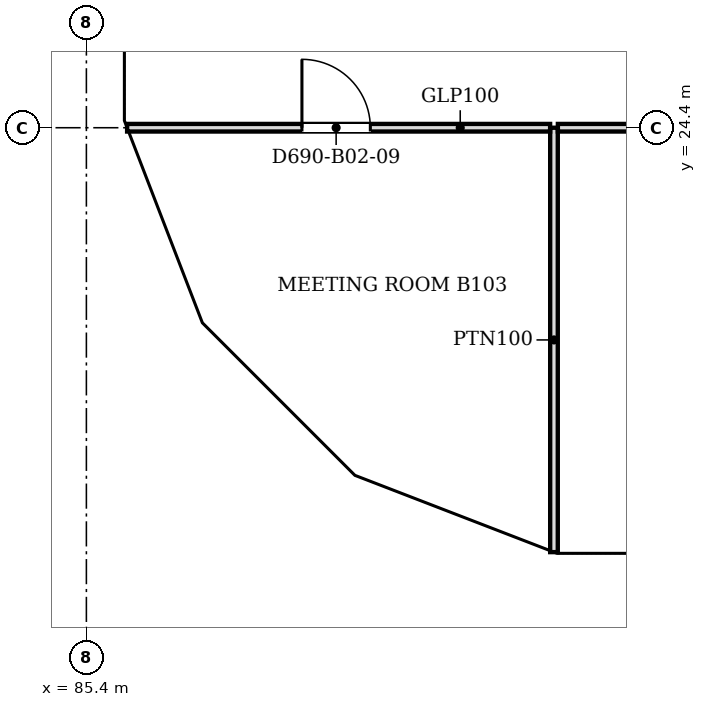
"""IFC4 building model, lengths in metres.
Left out: names, types, materials, properties, quantities, classifications, styles, units other than length and angle.
Written with IfcOpenShell. Run it as: python <this file> out.ifc"""

import sys

from ifc_helpers import new_model, si_unit, direction, frame, frame_2d, origin, place, context, subcontext, project, spatial, polyline, rectangle, outline, extrude, faceted_brep, source, transform, mapped, element, fill, save


model = new_model("IFC4")
c1 = context("Model", 3, precision=1e-05, world=origin(), true_north=direction((0.0, 1.0)))
c2 = subcontext(c1, "Body", "Model", "MODEL_VIEW")
j1 = project(units=[si_unit("LENGTHUNIT", "METRE"), si_unit("PLANEANGLEUNIT", "RADIAN")], contexts=[c1])
p1 = place(None, origin())
s1 = spatial("IfcSite", under=j1, at=p1, CompositionType="ELEMENT")
p2 = place(p1, origin())
s2 = spatial("IfcBuilding", under=s1, at=p2, CompositionType="ELEMENT")
p3 = place(p2, frame((0.0, 0.0, 21.3)))
s3 = spatial("IfcBuildingStorey", under=s2, at=p3, CompositionType="ELEMENT", Elevation=21.3)
m1 = source(origin(), c2, "Body", "Brep", [
    faceted_brep([(3.003, -0.25, 0.0), (6.053, -0.25, 4.5), (3.003, -0.25, 9.0), (0.0, -0.25, 4.5), (0.047, 0.25, 4.57), (3.003, 0.25, 9.0), (6.053, 0.25, 4.5), (3.003, 0.25, 0.0), (0.047, 0.25, 4.43), (0.0, 0.0, 4.5)], [[[0, 1, 2, 3]], [[4, 5, 6, 7, 8]], [[7, 6, 1, 0]], [[6, 5, 2, 1]], [[5, 4, 9, 3, 2]], [[8, 7, 0, 3, 9]], [[8, 9, 4]]]),
])
p4 = place(p3, frame((91.547, 18.55, -4.5), z_axis=(0.0, 0.0, 1.0), x_axis=(1.0, 0.0, 0.0)))
e1 = element("IfcWall", 1, at=p4, inside=s3, PredefinedType="SOLIDWALL", context=c2, shape_type="MappedRepresentation", body=[
    mapped(m1, transform((0.0, 0.0, 0.0), scale=1.0)),
])
m2 = source(origin(), c2, "Body", "SweptSolid", [
    extrude(outline(polyline([(3.005, 0.448), (5.751, 4.5), (3.005, 8.552), (0.301, 4.5), (3.005, 0.448)])), frame((0.0, 0.26, 0.0), z_axis=(0.0, -1.0, 0.0), x_axis=(1.0, 0.0, 0.0)), (0.0, 0.0, 1.0), 0.52),
])
p5 = place(p4, origin())
e2 = element("IfcOpeningElement", 2, at=p5, cuts=e1, PredefinedType="OPENING", context=c2, shape_type="MappedRepresentation", body=[
    mapped(m2, transform((0.0, 0.0, 0.0), scale=1.0)),
])
m3 = source(origin(), c2, "Body", "Brep", [
    faceted_brep([(1.753, -0.25, 0.0), (1.8, -0.25, 0.071), (1.8, -0.25, 8.929), (1.753, -0.25, 9.0), (0.0, -0.25, 6.373), (0.0, -0.25, 2.627), (0.0, 0.25, 2.627), (0.0, 0.25, 6.373), (1.707, 0.25, 8.93), (1.707, 0.25, 0.07), (1.753, 0.0, 0.0), (1.753, 0.0, 9.0)], [[[0, 1, 2, 3, 4, 5]], [[6, 7, 8, 9]], [[1, 0, 10]], [[11, 3, 2]], [[8, 7, 4, 3, 11]], [[7, 6, 5, 4]], [[6, 9, 10, 0, 5]], [[1, 10, 9, 8, 11, 2]]]),
])
p6 = place(p3, frame((85.65, 26.2, -4.5), z_axis=(0.0, 0.0, 1.0), x_axis=(0.0, -1.0, 0.0)))
e3 = element("IfcWall", 3, at=p6, inside=s3, PredefinedType="SOLIDWALL", context=c2, shape_type="MappedRepresentation", body=[
    mapped(m3, transform((0.0, 0.0, 0.0), scale=1.0)),
])
m4 = source(origin(), c2, "Body", "SweptSolid", [
    extrude(outline(polyline([(1.553, 8.25), (0.0, 5.922), (0.0, 3.077), (1.553, 0.75), (1.553, 8.25)])), frame((0.0, 0.26, 0.0), z_axis=(0.0, -1.0, 0.0), x_axis=(1.0, 0.0, 0.0)), (0.0, 0.0, 1.0), 0.52),
])
p7 = place(p6, origin())
e4 = element("IfcOpeningElement", 4, at=p7, cuts=e3, PredefinedType="OPENING", context=c2, shape_type="MappedRepresentation", body=[
    mapped(m4, transform((0.0, 0.0, 0.0), scale=1.0)),
])
m5 = source(origin(), c2, "Body", "Brep", [
    faceted_brep([(0.047, -0.25, 0.0), (2.997, -0.25, 4.5), (0.047, -0.25, 9.0), (0.0, -0.25, 8.93), (0.0, -0.25, 0.07), (0.093, 0.25, 8.929), (2.944, 0.25, 4.581), (2.944, 0.25, 4.419), (0.093, 0.25, 0.071), (2.997, 0.0, 4.5), (0.047, 0.0, 0.0), (0.047, 0.0, 9.0)], [[[0, 1, 2, 3, 4]], [[5, 6, 7, 8]], [[8, 7, 9, 1, 0, 10]], [[6, 5, 11, 2, 1, 9]], [[3, 2, 11]], [[10, 0, 4]], [[8, 10, 4, 3, 11, 5]], [[9, 7, 6]]]),
])
p8 = place(p3, frame((85.633, 24.49, -4.5), z_axis=(0.0, 0.0, 1.0), x_axis=(0.359901446078, -0.932990326376, 0.0)))
e5 = element("IfcWall", 5, at=p8, inside=s3, PredefinedType="SOLIDWALL", context=c2, shape_type="MappedRepresentation", body=[
    mapped(m5, transform((0.0, 0.0, 0.0), scale=1.0)),
])
m6 = source(origin(), c2, "Body", "SweptSolid", [
    extrude(outline(polyline([(0.247, 0.761), (2.698, 4.5), (0.247, 8.239), (0.247, 0.761)])), frame((0.0, 0.26, 0.0), z_axis=(0.0, -1.0, 0.0), x_axis=(1.0, 0.0, 0.0)), (0.0, 0.0, 1.0), 0.52),
])
p9 = place(p8, origin())
e6 = element("IfcOpeningElement", 6, at=p9, cuts=e5, PredefinedType="OPENING", context=c2, shape_type="MappedRepresentation", body=[
    mapped(m6, transform((0.0, 0.0, 0.0), scale=1.0)),
])
m7 = source(origin(), c2, "Body", "Brep", [
    faceted_brep([(2.944, -0.25, 0.0), (2.997, -0.25, 0.081), (2.997, -0.25, 8.919), (2.944, -0.25, 9.0), (0.0, -0.25, 4.5), (0.053, 0.25, 4.581), (2.891, 0.25, 8.919), (2.891, 0.25, 0.081), (0.053, 0.25, 4.419), (2.944, 0.0, 0.0), (2.944, 0.0, 9.0), (0.0, 0.0, 4.5)], [[[0, 1, 2, 3, 4]], [[5, 6, 7, 8]], [[1, 0, 9]], [[10, 3, 2]], [[6, 5, 11, 4, 3, 10]], [[8, 7, 9, 0, 4, 11]], [[8, 11, 5]], [[1, 9, 7, 6, 10, 2]]]),
])
p10 = place(p3, frame((86.712, 21.694, -4.5), z_axis=(0.0, 0.0, 1.0), x_axis=(0.707066050402, -0.707147509625, 0.0)))
e7 = element("IfcWall", 7, at=p10, inside=s3, PredefinedType="SOLIDWALL", context=c2, shape_type="MappedRepresentation", body=[
    mapped(m7, transform((0.0, 0.0, 0.0), scale=1.0)),
])
m8 = source(origin(), c2, "Body", "SweptSolid", [
    extrude(outline(polyline([(2.744, 8.238), (0.299, 4.5), (2.744, 0.762), (2.744, 8.238)])), frame((0.0, 0.26, 0.0), z_axis=(0.0, -1.0, 0.0), x_axis=(1.0, 0.0, 0.0)), (0.0, 0.0, 1.0), 0.52),
])
p11 = place(p10, origin())
e8 = element("IfcOpeningElement", 8, at=p11, cuts=e7, PredefinedType="OPENING", context=c2, shape_type="MappedRepresentation", body=[
    mapped(m8, transform((0.0, 0.0, 0.0), scale=1.0)),
])
m9 = source(origin(), c2, "Body", "Brep", [
    faceted_brep([(0.053, -0.25, 0.0), (3.003, -0.25, 4.5), (0.053, -0.25, 9.0), (0.0, -0.25, 8.919), (0.0, -0.25, 0.081), (0.106, 0.25, 8.919), (2.957, 0.25, 4.571), (2.957, 0.25, 4.429), (0.106, 0.25, 0.081), (3.003, 0.0, 4.5), (0.053, 0.0, 0.0), (0.053, 0.0, 9.0)], [[[0, 1, 2, 3, 4]], [[5, 6, 7, 8]], [[8, 7, 9, 1, 0, 10]], [[6, 5, 11, 2, 1, 9]], [[3, 2, 11]], [[10, 0, 4]], [[8, 10, 4, 3, 11, 5]], [[9, 7, 6]]]),
])
p12 = place(p3, frame((88.744, 19.631, -4.5), z_axis=(0.0, 0.0, 1.0), x_axis=(0.932997369089, -0.359883188373, 0.0)))
e9 = element("IfcWall", 9, at=p12, inside=s3, PredefinedType="SOLIDWALL", context=c2, shape_type="MappedRepresentation", body=[
    mapped(m9, transform((0.0, 0.0, 0.0), scale=1.0)),
])
m10 = source(origin(), c2, "Body", "SweptSolid", [
    extrude(outline(polyline([(0.253, 0.761), (2.705, 4.5), (0.253, 8.239), (0.253, 0.761)])), frame((0.0, 0.26, 0.0), z_axis=(0.0, -1.0, 0.0), x_axis=(1.0, 0.0, 0.0)), (0.0, 0.0, 1.0), 0.52),
])
p13 = place(p12, origin())
e10 = element("IfcOpeningElement", 10, at=p13, cuts=e9, PredefinedType="OPENING", context=c2, shape_type="MappedRepresentation", body=[
    mapped(m10, transform((0.0, 0.0, 0.0), scale=1.0)),
])
m11 = source(origin(), c2, "Body", "Brep", [
    faceted_brep([(0.047, -0.25, 0.0), (3.05, -0.25, 4.5), (0.0, -0.25, 4.5), (0.0, -0.25, 0.071), (0.093, 0.25, 4.5), (3.05, 0.25, 4.5), (0.093, 0.25, 0.07), (0.047, 0.0, 0.0)], [[[0, 1, 2, 3]], [[4, 5, 6]], [[6, 5, 1, 0, 7]], [[5, 4, 2, 1]], [[7, 0, 3]], [[6, 7, 3, 2, 4]]]),
])
p14 = place(p3, frame((91.5, 18.55, 0.0), z_axis=(0.0, 0.0, 1.0), x_axis=(1.0, 0.0, 0.0)))
e11 = element("IfcWall", 11, at=p14, inside=s3, PredefinedType="SOLIDWALL", context=c2, shape_type="MappedRepresentation", body=[
    mapped(m11, transform((0.0, 0.0, 0.0), scale=1.0)),
])
m12 = source(origin(), c2, "Body", "SweptSolid", [
    extrude(outline(polyline([(0.247, 0.75), (2.583, 4.25), (0.247, 4.25), (0.247, 0.75)])), frame((0.0, 0.26, 0.0), z_axis=(0.0, -1.0, 0.0), x_axis=(1.0, 0.0, 0.0)), (0.0, 0.0, 1.0), 0.52),
])
p15 = place(p14, origin())
e12 = element("IfcOpeningElement", 12, at=p15, cuts=e11, PredefinedType="OPENING", context=c2, shape_type="MappedRepresentation", body=[
    mapped(m12, transform((0.0, 0.0, 0.0), scale=1.0)),
])
m13 = source(origin(), c2, "Body", "Brep", [
    faceted_brep([(2.95, -0.25, 0.0), (2.997, -0.25, 0.07), (2.997, -0.25, 4.5), (0.0, -0.25, 4.5), (0.053, 0.25, 4.5), (2.904, 0.25, 4.5), (2.904, 0.25, 0.071), (0.053, 0.25, 4.419), (2.95, 0.0, 0.0), (0.0, 0.0, 4.5)], [[[0, 1, 2, 3]], [[4, 5, 6, 7]], [[1, 0, 8]], [[5, 4, 9, 3, 2]], [[7, 6, 8, 0, 3, 9]], [[7, 9, 4]], [[1, 8, 6, 5, 2]]]),
])
p16 = place(p3, frame((88.794, 19.612, 0.0), z_axis=(0.0, 0.0, 1.0), x_axis=(0.933000876937, -0.359874094142, 0.0)))
e13 = element("IfcWall", 13, at=p16, inside=s3, PredefinedType="SOLIDWALL", context=c2, shape_type="MappedRepresentation", body=[
    mapped(m13, transform((0.0, 0.0, 0.0), scale=1.0)),
])
m14 = source(origin(), c2, "Body", "SweptSolid", [
    extrude(outline(polyline([(2.75, 4.25), (0.463, 4.25), (2.75, 0.761), (2.75, 4.25)])), frame((0.0, 0.26, 0.0), z_axis=(0.0, -1.0, 0.0), x_axis=(1.0, 0.0, 0.0)), (0.0, 0.0, 1.0), 0.52),
])
p17 = place(p16, origin())
e14 = element("IfcOpeningElement", 14, at=p17, cuts=e13, PredefinedType="OPENING", context=c2, shape_type="MappedRepresentation", body=[
    mapped(m14, transform((0.0, 0.0, 0.0), scale=1.0)),
])
m15 = source(origin(), c2, "Body", "Brep", [
    faceted_brep([(3.05, -0.25, 0.0), (6.053, -0.25, 4.5), (0.0, -0.25, 4.5), (0.0, 0.25, 4.5), (6.007, 0.25, 4.5), (6.007, 0.25, 4.43), (3.05, 0.25, 0.0), (6.053, 0.0, 4.5)], [[[0, 1, 2]], [[3, 4, 5, 6]], [[6, 5, 7, 1, 0]], [[4, 3, 2, 1, 7]], [[3, 6, 0, 2]], [[5, 4, 7]]]),
])
p18 = place(p3, frame((85.65, 30.5, 0.0), z_axis=(0.0, 0.0, 1.0), x_axis=(0.0, -1.0, 0.0)))
e15 = element("IfcWall", 15, at=p18, inside=s3, PredefinedType="SOLIDWALL", context=c2, shape_type="MappedRepresentation", body=[
    mapped(m15, transform((0.0, 0.0, 0.0), scale=1.0)),
])
m16 = source(origin(), c2, "Body", "SweptSolid", [
    extrude(outline(polyline([(3.048, 0.448), (5.586, 4.25), (0.471, 4.25), (3.048, 0.448)])), frame((0.0, 0.26, 0.0), z_axis=(0.0, -1.0, 0.0), x_axis=(1.0, 0.0, 0.0)), (0.0, 0.0, 1.0), 0.52),
])
p19 = place(p18, origin())
e16 = element("IfcOpeningElement", 16, at=p19, cuts=e15, PredefinedType="OPENING", context=c2, shape_type="MappedRepresentation", body=[
    mapped(m16, transform((0.0, 0.0, 0.0), scale=1.0)),
])
m17 = source(origin(), c2, "Body", "Brep", [
    faceted_brep([(2.95, -0.25, 0.0), (3.003, -0.25, 0.081), (3.003, -0.25, 4.5), (0.0, -0.25, 4.5), (0.047, 0.25, 4.5), (2.898, 0.25, 4.5), (2.898, 0.25, 0.081), (0.047, 0.25, 4.429), (2.95, 0.0, 0.0), (0.0, 0.0, 4.5)], [[[0, 1, 2, 3]], [[4, 5, 6, 7]], [[1, 0, 8]], [[5, 4, 9, 3, 2]], [[7, 6, 8, 0, 3, 9]], [[7, 9, 4]], [[1, 8, 6, 5, 2]]]),
])
p20 = place(p3, frame((85.65, 24.447, 0.0), z_axis=(0.0, 0.0, 1.0), x_axis=(0.35992665181, -0.932980602862, 0.0)))
e17 = element("IfcWall", 17, at=p20, inside=s3, PredefinedType="SOLIDWALL", context=c2, shape_type="MappedRepresentation", body=[
    mapped(m17, transform((0.0, 0.0, 0.0), scale=1.0)),
])
p21 = place(p20, origin())
e18 = element("IfcOpeningElement", 18, at=p21, cuts=e17, PredefinedType="OPENING", context=c2, shape_type="MappedRepresentation", body=[
    mapped(m14, transform((0.0, 0.0, 0.0), scale=1.0)),
])
m18 = source(origin(), c2, "Body", "Brep", [
    faceted_brep([(0.053, -0.25, 0.0), (2.997, -0.25, 4.5), (0.0, -0.25, 4.5), (0.0, -0.25, 0.081), (0.106, 0.25, 4.5), (2.944, 0.25, 4.5), (2.944, 0.25, 4.419), (0.106, 0.25, 0.081), (2.997, 0.0, 4.5), (0.053, 0.0, 0.0)], [[[0, 1, 2, 3]], [[4, 5, 6, 7]], [[7, 6, 8, 1, 0, 9]], [[5, 4, 2, 1, 8]], [[9, 0, 3]], [[7, 9, 3, 2, 4]], [[6, 5, 8]]]),
])
p22 = place(p3, frame((86.675, 21.731, 0.0), z_axis=(0.0, 0.0, 1.0), x_axis=(0.707106781187, -0.707106781187, 0.0)))
e19 = element("IfcWall", 19, at=p22, inside=s3, PredefinedType="SOLIDWALL", context=c2, shape_type="MappedRepresentation", body=[
    mapped(m18, transform((0.0, 0.0, 0.0), scale=1.0)),
])
m19 = source(origin(), c2, "Body", "SweptSolid", [
    extrude(outline(polyline([(0.253, 0.762), (2.535, 4.25), (0.253, 4.25), (0.253, 0.762)])), frame((0.0, 0.26, 0.0), z_axis=(0.0, -1.0, 0.0), x_axis=(1.0, 0.0, 0.0)), (0.0, 0.0, 1.0), 0.52),
])
p23 = place(p22, origin())
e20 = element("IfcOpeningElement", 20, at=p23, cuts=e19, PredefinedType="OPENING", context=c2, shape_type="MappedRepresentation", body=[
    mapped(m19, transform((0.0, 0.0, 0.0), scale=1.0)),
])
p24 = place(p3, frame((91.552, 18.816, 0.0), z_axis=(0.0, 0.0, 1.0), x_axis=(0.0, 1.0, 0.0)))
e21 = element("IfcWall", 21, at=p24, inside=s3, PredefinedType="PARTITIONING", context=c2, shape_type="SweptSolid", body=[
    extrude(rectangle(XDim=5.584, YDim=0.1, at=frame_2d((2.792, 0.0))), origin(), (0.0, 0.0, 1.0), 3.767),
])
p25 = place(p3, frame((91.501, 24.4, 0.0), z_axis=(0.0, 0.0, 1.0), x_axis=(-1.0, 0.0, 0.0)))
e22 = element("IfcWall", 22, at=p25, inside=s3, PredefinedType="PARTITIONING", context=c2, shape_type="SweptSolid", body=[
    extrude(rectangle(XDim=5.565, YDim=0.1, at=frame_2d((2.783, 0.0))), origin(), (0.0, 0.0, 1.0), 3.767),
])
m20 = source(origin(), c2, "Body", "SweptSolid", [
    extrude(rectangle(XDim=0.9, YDim=2.1, at=frame_2d((0.45, 1.05))), frame((0.0, 0.06, 0.0), z_axis=(0.0, -1.0, 0.0), x_axis=(1.0, 0.0, 0.0)), (0.0, 0.0, 1.0), 0.12),
])
p26 = place(p25, frame((2.365, 0.0, 0.0)))
e23 = element("IfcOpeningElement", 23, at=p26, cuts=e22, PredefinedType="OPENING", context=c2, shape_type="MappedRepresentation", body=[
    mapped(m20, transform((0.0, 0.0, 0.0), scale=1.0)),
])
p27 = place(p3, frame((97.149, 24.4, 0.0), z_axis=(0.0, 0.0, 1.0), x_axis=(-1.0, 0.0, 0.0)))
e24 = element("IfcWall", 24, at=p27, inside=s3, PredefinedType="PARTITIONING", context=c2, shape_type="SweptSolid", body=[
    extrude(rectangle(XDim=5.546, YDim=0.1, at=frame_2d((2.773, 0.0))), origin(), (0.0, 0.0, 1.0), 3.767),
])
p28 = place(p27, frame((2.346, 0.0, 0.0)))
e25 = element("IfcOpeningElement", 25, at=p28, cuts=e24, PredefinedType="OPENING", context=c2, shape_type="MappedRepresentation", body=[
    mapped(m20, transform((0.0, 0.0, 0.0), scale=1.0)),
])
m21 = source(origin(), c2, "Body", "SweptSolid", [
    extrude(rectangle(XDim=0.9, YDim=2.1, at=frame_2d((0.45, 1.05))), frame((0.0, 0.025, 0.0), z_axis=(0.0, -1.0, 0.0), x_axis=(1.0, 0.0, 0.0)), (0.0, 0.0, 1.0), 0.05),
])
p29 = place(p26, origin())
e26 = element("IfcDoor", 26, at=p29, inside=s3, OperationType="SINGLE_SWING_RIGHT", PredefinedType="DOOR", context=c2, shape_type="MappedRepresentation", body=[
    mapped(m21, transform((0.0, 0.0, 0.0), scale=1.0)),
])
fill(e23, e26)
save(model, sys.argv[1])
